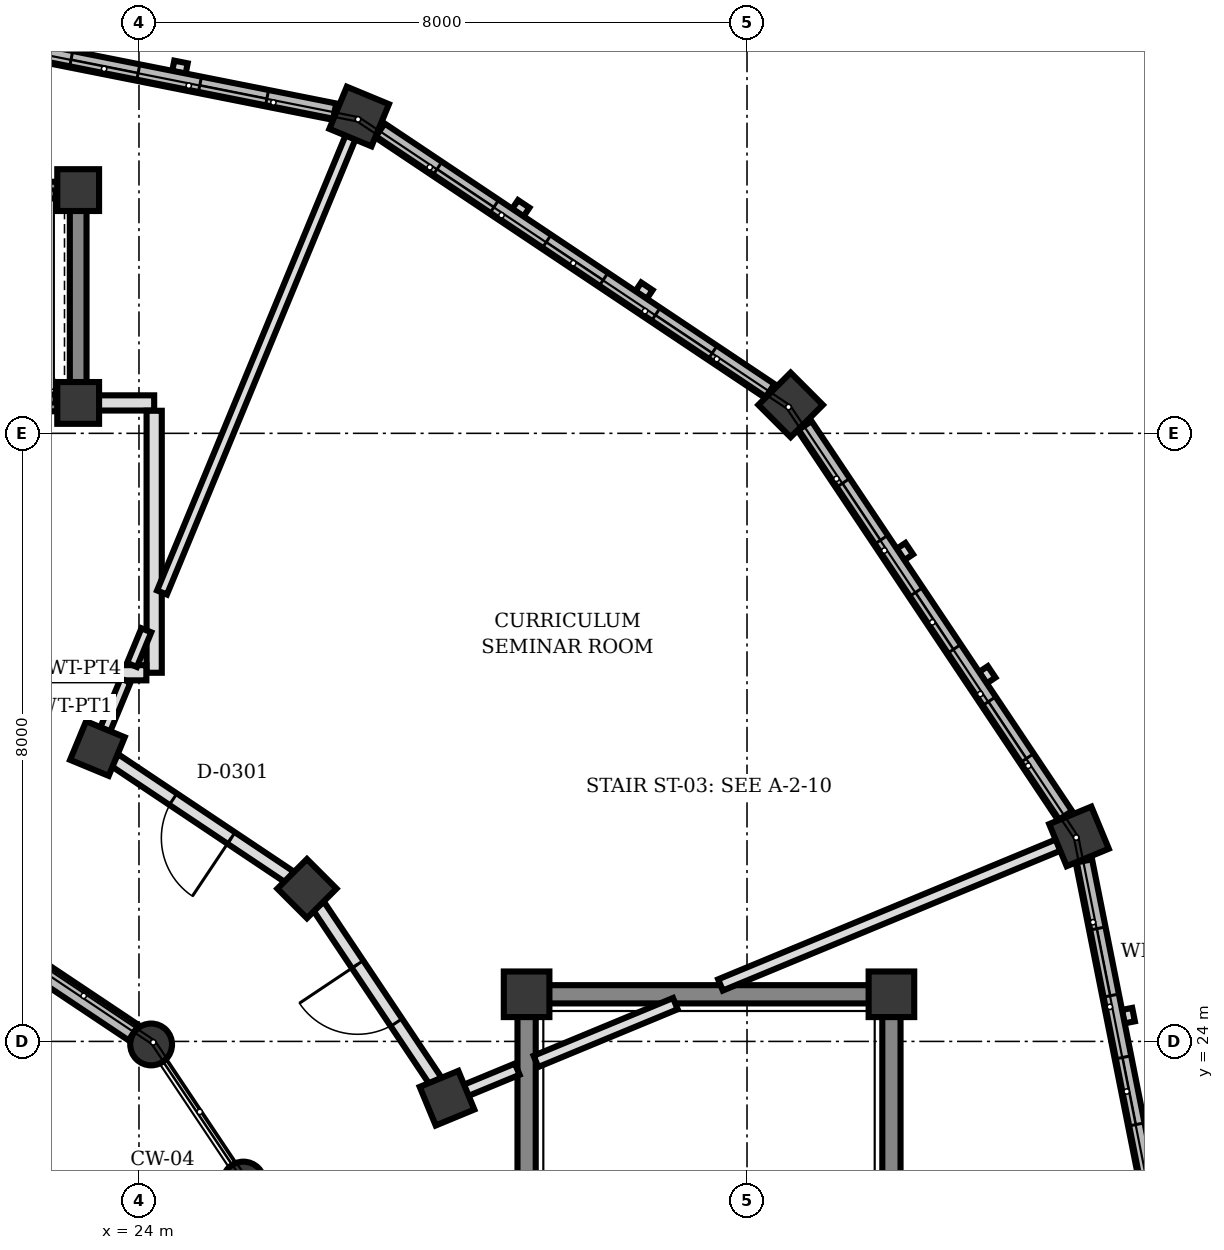
"""IFC4 building model, lengths in metres.
Left out: names, types, materials, properties, quantities, classifications, styles, units other than length and angle.
Written with IfcOpenShell. Run it as: python <this file> out.ifc"""

import sys

from ifc_helpers import new_model, si_unit, direction, frame, frame_2d, origin, origin_2d, place, context, subcontext, project, spatial, rectangle, circle, extrude, element, fill, save


model = new_model("IFC4")
c1 = context("Model", 3, precision=1e-05, world=origin(), true_north=direction((0.0, 1.0)))
c2 = subcontext(c1, "Body", "Model", "MODEL_VIEW")
j1 = project(units=[si_unit("LENGTHUNIT", "METRE"), si_unit("PLANEANGLEUNIT", "RADIAN")], contexts=[c1])
p1 = place(None, origin())
s1 = spatial("IfcSite", under=j1, at=p1, CompositionType="ELEMENT")
p2 = place(p1, origin())
s2 = spatial("IfcBuilding", under=s1, at=p2, CompositionType="ELEMENT")
p3 = place(p2, frame((0.0, 0.0, 8.5)))
s3 = spatial("IfcBuildingStorey", under=s2, at=p3, CompositionType="ELEMENT", Elevation=8.5)
for number, where, z_axis, x_axis in (
    (1, (33.9, 24.62, 0.0), (0.0, 0.0, 1.0), (1.0, 0.0, 0.0)),
    (2, (29.1, 24.62, 0.0), (0.0, 0.0, 1.0), (1.0, 0.0, 0.0)),
):
    element("IfcColumn", number, at=place(p3, frame(where, z_axis=z_axis, x_axis=x_axis)), inside=s3, PredefinedType="COLUMN", context=c2, shape_type="SweptSolid", body=[
        extrude(rectangle(XDim=0.6, YDim=0.6, at=origin_2d()), origin(), (0.0, 0.0, 1.0), 4.0),
    ])
for number, where, z_axis, x_axis in (
    (3, (23.2, 32.4, 0.0), (0.0, 0.0, 1.0), (1.0, 0.0, 0.0)),
    (4, (23.2, 35.2, 0.0), (0.0, 0.0, 1.0), (1.0, 0.0, 0.0)),
):
    element("IfcColumn", number, at=place(p3, frame(where, z_axis=z_axis, x_axis=x_axis)), inside=s3, PredefinedType="COLUMN", context=c2, shape_type="SweptSolid", body=[
        extrude(rectangle(XDim=0.55, YDim=0.55, at=origin_2d()), origin(), (0.0, 0.0, 1.0), 4.0),
    ])
for number, where, z_axis, x_axis in (
    (5, (25.374, 22.143, 0.0), (0.0, 0.0, 1.0), (1.0, 0.0, 0.0)),
    (6, (24.16, 23.96, 0.0), (0.0, 0.0, 1.0), (1.0, 0.0, 0.0)),
):
    element("IfcColumn", number, at=place(p3, frame(where, z_axis=z_axis, x_axis=x_axis)), inside=s3, PredefinedType="COLUMN", context=c2, shape_type="SweptSolid", body=[
        extrude(circle(Radius=0.275, at=origin_2d()), origin(), (0.0, 0.0, 1.0), 4.0),
    ])
for number, where, z_axis, x_axis in (
    (7, (28.053, 23.253, 0.0), (0.0, 0.0, 1.0), (0.924, 0.383, 0.0)),
    (8, (26.21, 26.01, 0.0), (0.0, 0.0, 1.0), (0.707, 0.707, 0.0)),
    (9, (23.453, 27.853, 0.0), (0.0, 0.0, 1.0), (0.383, 0.924, 0.0)),
):
    element("IfcColumn", number, at=place(p3, frame(where, z_axis=z_axis, x_axis=x_axis)), inside=s3, PredefinedType="COLUMN", context=c2, shape_type="SweptSolid", body=[
        extrude(rectangle(XDim=0.55, YDim=0.55, at=origin_2d()), origin(), (0.0, 0.0, 1.0), 4.0),
    ])
for number, where, z_axis, x_axis in (
    (10, (36.368, 26.697, 0.0), (0.0, 0.0, 1.0), (0.924, 0.383, 0.0)),
    (11, (32.574, 32.374, 0.0), (0.0, 0.0, 1.0), (0.707, 0.707, 0.0)),
    (12, (26.897, 36.168, 0.0), (0.0, 0.0, 1.0), (0.383, 0.924, 0.0)),
):
    element("IfcColumn", number, at=place(p3, frame(where, z_axis=z_axis, x_axis=x_axis)), inside=s3, PredefinedType="COLUMN", context=c2, shape_type="SweptSolid", body=[
        extrude(rectangle(XDim=0.6, YDim=0.6, at=origin_2d()), origin(), (0.0, 0.0, 1.0), 4.0),
    ])
p4 = place(p3, frame((36.432, 26.374, 0.0), z_axis=(0.0, 0.0, 1.0), x_axis=(0.195164813773, -0.980770460131, 0.0)))
e13 = element("IfcWall", 13, at=p4, inside=s3, PredefinedType="SOLIDWALL", context=c2, shape_type="SweptSolid", body=[
    extrude(rectangle(XDim=6.17, YDim=0.22, at=frame_2d((3.085, 0.0))), origin(), (0.0, 0.0, 1.0), 3.172),
])
p5 = place(p4, frame((0.907, 0.0, 0.85)))
e14 = element("IfcOpeningElement", 14, at=p5, cuts=e13, PredefinedType="OPENING", context=c2, shape_type="SweptSolid", body=[
    extrude(rectangle(XDim=0.9, YDim=1.4, at=frame_2d((0.45, 0.7))), frame((0.0, 0.12, 0.0), z_axis=(0.0, -1.0, 0.0), x_axis=(1.0, 0.0, 0.0)), (0.0, 0.0, 1.0), 0.24),
])
p6 = place(p4, frame((2.635, 0.0, 0.85)))
e15 = element("IfcOpeningElement", 15, at=p6, cuts=e13, PredefinedType="OPENING", context=c2, shape_type="SweptSolid", body=[
    extrude(rectangle(XDim=0.9, YDim=1.4, at=frame_2d((0.45, 0.7))), frame((0.0, 0.12, 0.0), z_axis=(0.0, -1.0, 0.0), x_axis=(1.0, 0.0, 0.0)), (0.0, 0.0, 1.0), 0.24),
])
p7 = place(p4, frame((4.362, 0.0, 0.85)))
e16 = element("IfcOpeningElement", 16, at=p7, cuts=e13, PredefinedType="OPENING", context=c2, shape_type="SweptSolid", body=[
    extrude(rectangle(XDim=0.9, YDim=1.4, at=frame_2d((0.45, 0.7))), frame((0.0, 0.12, 0.0), z_axis=(0.0, -1.0, 0.0), x_axis=(1.0, 0.0, 0.0)), (0.0, 0.0, 1.0), 0.24),
])
p8 = place(p3, frame((32.757, 32.1, 0.0), z_axis=(0.0, 0.0, 1.0), x_axis=(0.555658736667, -0.831410469242, 0.0)))
e17 = element("IfcWall", 17, at=p8, inside=s3, PredefinedType="SOLIDWALL", context=c2, shape_type="SweptSolid", body=[
    extrude(rectangle(XDim=6.169, YDim=0.22, at=frame_2d((3.084, 0.0))), origin(), (0.0, 0.0, 1.0), 3.172),
])
p9 = place(p8, frame((0.907, 0.0, 0.85)))
e18 = element("IfcOpeningElement", 18, at=p9, cuts=e17, PredefinedType="OPENING", context=c2, shape_type="SweptSolid", body=[
    extrude(rectangle(XDim=0.9, YDim=1.4, at=frame_2d((0.45, 0.7))), frame((0.0, 0.12, 0.0), z_axis=(0.0, -1.0, 0.0), x_axis=(1.0, 0.0, 0.0)), (0.0, 0.0, 1.0), 0.24),
])
p10 = place(p8, frame((2.635, 0.0, 0.85)))
e19 = element("IfcOpeningElement", 19, at=p10, cuts=e17, PredefinedType="OPENING", context=c2, shape_type="SweptSolid", body=[
    extrude(rectangle(XDim=0.9, YDim=1.4, at=frame_2d((0.45, 0.7))), frame((0.0, 0.12, 0.0), z_axis=(0.0, -1.0, 0.0), x_axis=(1.0, 0.0, 0.0)), (0.0, 0.0, 1.0), 0.24),
])
p11 = place(p8, frame((4.362, 0.0, 0.85)))
e20 = element("IfcOpeningElement", 20, at=p11, cuts=e17, PredefinedType="OPENING", context=c2, shape_type="SweptSolid", body=[
    extrude(rectangle(XDim=0.9, YDim=1.4, at=frame_2d((0.45, 0.7))), frame((0.0, 0.12, 0.0), z_axis=(0.0, -1.0, 0.0), x_axis=(1.0, 0.0, 0.0)), (0.0, 0.0, 1.0), 0.24),
])
p12 = place(p3, frame((27.171, 35.985, 0.0), z_axis=(0.0, 0.0, 1.0), x_axis=(0.831392186772, -0.55568609104, 0.0)))
e21 = element("IfcWall", 21, at=p12, inside=s3, PredefinedType="SOLIDWALL", context=c2, shape_type="SweptSolid", body=[
    extrude(rectangle(XDim=6.169, YDim=0.22, at=frame_2d((3.085, 0.0))), origin(), (0.0, 0.0, 1.0), 3.172),
])
p13 = place(p12, frame((0.907, 0.0, 0.85)))
e22 = element("IfcOpeningElement", 22, at=p13, cuts=e21, PredefinedType="OPENING", context=c2, shape_type="SweptSolid", body=[
    extrude(rectangle(XDim=0.9, YDim=1.4, at=frame_2d((0.45, 0.7))), frame((0.0, 0.12, 0.0), z_axis=(0.0, -1.0, 0.0), x_axis=(1.0, 0.0, 0.0)), (0.0, 0.0, 1.0), 0.24),
])
p14 = place(p12, frame((2.635, 0.0, 0.85)))
e23 = element("IfcOpeningElement", 23, at=p14, cuts=e21, PredefinedType="OPENING", context=c2, shape_type="SweptSolid", body=[
    extrude(rectangle(XDim=0.9, YDim=1.4, at=frame_2d((0.45, 0.7))), frame((0.0, 0.12, 0.0), z_axis=(0.0, -1.0, 0.0), x_axis=(1.0, 0.0, 0.0)), (0.0, 0.0, 1.0), 0.24),
])
p15 = place(p12, frame((4.362, 0.0, 0.85)))
e24 = element("IfcOpeningElement", 24, at=p15, cuts=e21, PredefinedType="OPENING", context=c2, shape_type="SweptSolid", body=[
    extrude(rectangle(XDim=0.9, YDim=1.4, at=frame_2d((0.45, 0.7))), frame((0.0, 0.12, 0.0), z_axis=(0.0, -1.0, 0.0), x_axis=(1.0, 0.0, 0.0)), (0.0, 0.0, 1.0), 0.24),
])
p16 = place(p3, frame((23.93, 24.114, 0.0), z_axis=(0.0, 0.0, 1.0), x_axis=(-0.83165874011, 0.555287078904, 0.0)))
e25 = element("IfcWall", 25, at=p16, inside=s3, PredefinedType="SOLIDWALL", context=c2, shape_type="SweptSolid", body=[
    extrude(rectangle(XDim=1.632, YDim=0.24, at=frame_2d((0.816, 0.0))), origin(), (0.0, 0.0, 1.0), 3.222),
])
p17 = place(p3, frame((20.523, 37.436, 0.0), z_axis=(0.0, 0.0, 1.0), x_axis=(0.980770460131, -0.195164813773, 0.0)))
e26 = element("IfcWall", 26, at=p17, inside=s3, PredefinedType="SOLIDWALL", context=c2, shape_type="SweptSolid", body=[
    extrude(rectangle(XDim=6.17, YDim=0.22, at=frame_2d((3.085, 0.0))), origin(), (0.0, 0.0, 1.0), 3.172),
])
p18 = place(p17, frame((0.907, 0.0, 0.85)))
e27 = element("IfcOpeningElement", 27, at=p18, cuts=e26, PredefinedType="OPENING", context=c2, shape_type="SweptSolid", body=[
    extrude(rectangle(XDim=0.9, YDim=1.4, at=frame_2d((0.45, 0.7))), frame((0.0, 0.12, 0.0), z_axis=(0.0, -1.0, 0.0), x_axis=(1.0, 0.0, 0.0)), (0.0, 0.0, 1.0), 0.24),
])
p19 = place(p17, frame((2.635, 0.0, 0.85)))
e28 = element("IfcOpeningElement", 28, at=p19, cuts=e26, PredefinedType="OPENING", context=c2, shape_type="SweptSolid", body=[
    extrude(rectangle(XDim=0.9, YDim=1.4, at=frame_2d((0.45, 0.7))), frame((0.0, 0.12, 0.0), z_axis=(0.0, -1.0, 0.0), x_axis=(1.0, 0.0, 0.0)), (0.0, 0.0, 1.0), 0.24),
])
p20 = place(p17, frame((4.362, 0.0, 0.85)))
e29 = element("IfcOpeningElement", 29, at=p20, cuts=e26, PredefinedType="OPENING", context=c2, shape_type="SweptSolid", body=[
    extrude(rectangle(XDim=0.9, YDim=1.4, at=frame_2d((0.45, 0.7))), frame((0.0, 0.12, 0.0), z_axis=(0.0, -1.0, 0.0), x_axis=(1.0, 0.0, 0.0)), (0.0, 0.0, 1.0), 0.24),
])
p21 = place(p3, frame((29.1, 16.192, 0.0), z_axis=(0.0, 0.0, 1.0), x_axis=(0.0, 1.0, 0.0)))
e30 = element("IfcWall", 30, at=p21, inside=s3, PredefinedType="SHEAR", context=c2, shape_type="SweptSolid", body=[
    extrude(rectangle(XDim=8.136, YDim=0.24, at=frame_2d((4.068, 0.0))), origin(), (0.0, 0.0, 1.0), 3.74),
])
p22 = place(p21, frame((1.012, 0.0, 0.0)))
e31 = element("IfcOpeningElement", 31, at=p22, cuts=e30, PredefinedType="OPENING", context=c2, shape_type="SweptSolid", body=[
    extrude(rectangle(XDim=0.88, YDim=2.1, at=frame_2d((0.44, 1.05))), frame((0.0, 0.13, 0.0), z_axis=(0.0, -1.0, 0.0), x_axis=(1.0, 0.0, 0.0)), (0.0, 0.0, 1.0), 0.26),
])
p23 = place(p3, frame((33.9, 24.328, 0.0), z_axis=(0.0, 0.0, 1.0), x_axis=(0.0, -1.0, 0.0)))
e32 = element("IfcWall", 32, at=p23, inside=s3, PredefinedType="SHEAR", context=c2, shape_type="SweptSolid", body=[
    extrude(rectangle(XDim=8.136, YDim=0.24, at=frame_2d((4.068, 0.0))), origin(), (0.0, 0.0, 1.0), 3.74),
])
p24 = place(p3, frame((33.608, 24.62, 0.0), z_axis=(0.0, 0.0, 1.0), x_axis=(-1.0, 0.0, 0.0)))
e33 = element("IfcWall", 33, at=p24, inside=s3, PredefinedType="SHEAR", context=c2, shape_type="SweptSolid", body=[
    extrude(rectangle(XDim=4.216, YDim=0.24, at=frame_2d((2.108, 0.0))), origin(), (0.0, 0.0, 1.0), 3.74),
])
p25 = place(p3, frame((20.867, 32.4, 0.0), z_axis=(0.0, 0.0, 1.0), x_axis=(1.0, 0.0, 0.0)))
e34 = element("IfcWall", 34, at=p25, inside=s3, PredefinedType="SHEAR", context=c2, shape_type="SweptSolid", body=[
    extrude(rectangle(XDim=2.066, YDim=0.22, at=frame_2d((1.033, 0.0))), origin(), (0.0, 0.0, 1.0), 3.74),
])
p26 = place(p25, frame((0.483, 0.0, 0.0)))
e35 = element("IfcOpeningElement", 35, at=p26, cuts=e34, PredefinedType="OPENING", context=c2, shape_type="SweptSolid", body=[
    extrude(rectangle(XDim=1.1, YDim=2.15, at=frame_2d((0.55, 1.075))), frame((0.0, 0.12, 0.0), z_axis=(0.0, -1.0, 0.0), x_axis=(1.0, 0.0, 0.0)), (0.0, 0.0, 1.0), 0.24),
])
p27 = place(p3, frame((23.2, 32.667, 0.0), z_axis=(0.0, 0.0, 1.0), x_axis=(0.0, 1.0, 0.0)))
e36 = element("IfcWall", 36, at=p27, inside=s3, PredefinedType="SHEAR", context=c2, shape_type="SweptSolid", body=[
    extrude(rectangle(XDim=2.266, YDim=0.22, at=frame_2d((1.133, 0.0))), origin(), (0.0, 0.0, 1.0), 3.74),
])
p28 = place(p3, frame((22.933, 35.2, 0.0), z_axis=(0.0, 0.0, 1.0), x_axis=(-1.0, 0.0, 0.0)))
e37 = element("IfcWall", 37, at=p28, inside=s3, PredefinedType="SHEAR", context=c2, shape_type="SweptSolid", body=[
    extrude(rectangle(XDim=2.066, YDim=0.22, at=frame_2d((1.033, 0.0))), origin(), (0.0, 0.0, 1.0), 3.74),
])
p29 = place(p3, frame((23.467, 32.4, 0.0), z_axis=(0.0, 0.0, 1.0), x_axis=(1.0, 0.0, 0.0)))
e38 = element("IfcWall", 38, at=p29, inside=s3, PredefinedType="PARTITIONING", context=c2, shape_type="SweptSolid", body=[
    extrude(rectangle(XDim=0.733, YDim=0.2, at=frame_2d((0.366, 0.0))), origin(), (0.0, 0.0, 1.0), 3.7),
])
p30 = place(p3, frame((24.2, 28.85, 0.0), z_axis=(0.0, 0.0, 1.0), x_axis=(0.0, 1.0, 0.0)))
e39 = element("IfcWall", 39, at=p30, inside=s3, PredefinedType="PARTITIONING", context=c2, shape_type="SweptSolid", body=[
    extrude(rectangle(XDim=3.447, YDim=0.2, at=frame_2d((1.724, 0.0))), origin(), (0.0, 0.0, 1.0), 3.072),
])
p31 = place(p3, frame((24.097, 28.85, 0.0), z_axis=(0.0, 0.0, 1.0), x_axis=(-1.0, 0.0, 0.0)))
e40 = element("IfcWall", 40, at=p31, inside=s3, PredefinedType="PARTITIONING", context=c2, shape_type="SweptSolid", body=[
    extrude(rectangle(XDim=3.394, YDim=0.2, at=frame_2d((1.697, 0.0))), origin(), (0.0, 0.0, 1.0), 3.072),
])
p32 = place(p31, frame((1.519, 0.0, 0.0)))
e41 = element("IfcOpeningElement", 41, at=p32, cuts=e40, PredefinedType="OPENING", context=c2, shape_type="SweptSolid", body=[
    extrude(rectangle(XDim=0.9, YDim=2.2, at=frame_2d((0.45, 1.1))), frame((0.0, 0.11, 0.0), z_axis=(0.0, -1.0, 0.0), x_axis=(1.0, 0.0, 0.0)), (0.0, 0.0, 1.0), 0.22),
])
p33 = place(p3, frame((28.3, 23.355, 0.0), z_axis=(0.0, 0.0, 1.0), x_axis=(0.924069600435, 0.382224245113, 0.0)))
e42 = element("IfcWall", 42, at=p33, inside=s3, PredefinedType="PARTITIONING", context=c2, shape_type="SweptSolid", body=[
    extrude(rectangle(XDim=0.733, YDim=0.16, at=frame_2d((0.366, 0.0))), origin(), (0.0, 0.0, 1.0), 3.7),
])
p34 = place(p3, frame((29.223, 23.737, 0.0), z_axis=(0.0, 0.0, 1.0), x_axis=(0.923817443679, 0.382833293686, 0.0)))
e43 = element("IfcWall", 43, at=p34, inside=s3, PredefinedType="PARTITIONING", context=c2, shape_type="SweptSolid", body=[
    extrude(rectangle(XDim=1.985, YDim=0.16, at=frame_2d((0.993, 0.0))), origin(), (0.0, 0.0, 1.0), 3.7),
])
p35 = place(p3, frame((31.651, 24.743, 0.0), z_axis=(0.0, 0.0, 1.0), x_axis=(0.923877739946, 0.382687759972, 0.0)))
e44 = element("IfcWall", 44, at=p35, inside=s3, PredefinedType="PARTITIONING", context=c2, shape_type="SweptSolid", body=[
    extrude(rectangle(XDim=4.813, YDim=0.16, at=frame_2d((2.407, 0.0))), origin(), (0.0, 0.0, 1.0), 3.7),
])
p36 = place(p3, frame((23.555, 28.1, 0.0), z_axis=(0.0, 0.0, 1.0), x_axis=(0.38278283439, 0.923838352579, 0.0)))
e45 = element("IfcWall", 45, at=p36, inside=s3, PredefinedType="PARTITIONING", context=c2, shape_type="SweptSolid", body=[
    extrude(rectangle(XDim=0.7, YDim=0.14, at=frame_2d((0.35, 0.0))), origin(), (0.0, 0.0, 1.0), 3.072),
])
p37 = place(p3, frame((23.908, 28.953, 0.0), z_axis=(0.0, 0.0, 1.0), x_axis=(0.3827885685, 0.92383597669, 0.0)))
e46 = element("IfcWall", 46, at=p37, inside=s3, PredefinedType="PARTITIONING", context=c2, shape_type="SweptSolid", body=[
    extrude(rectangle(XDim=0.494, YDim=0.14, at=frame_2d((0.247, 0.0))), origin(), (0.0, 0.0, 1.0), 3.072),
])
p38 = place(p3, frame((24.303, 29.906, 0.0), z_axis=(0.0, 0.0, 1.0), x_axis=(0.382682035927, 0.923880110934, 0.0)))
e47 = element("IfcWall", 47, at=p38, inside=s3, PredefinedType="PARTITIONING", context=c2, shape_type="SweptSolid", body=[
    extrude(rectangle(XDim=6.486, YDim=0.14, at=frame_2d((3.243, 0.0))), origin(), (0.0, 0.0, 1.0), 3.072),
])
p39 = place(p3, frame((27.902, 23.479, 0.0), z_axis=(0.0, 0.0, 1.0), x_axis=(-0.555797002478, 0.831318045056, 0.0)))
e48 = element("IfcWall", 48, at=p39, inside=s3, PredefinedType="PARTITIONING", context=c2, shape_type="SweptSolid", body=[
    extrude(rectangle(XDim=2.773, YDim=0.18, at=frame_2d((1.386, 0.0))), origin(), (0.0, 0.0, 1.0), 3.072),
])
p40 = place(p39, frame((0.926, 0.0, 0.0)))
e49 = element("IfcOpeningElement", 49, at=p40, cuts=e48, PredefinedType="OPENING", context=c2, shape_type="SweptSolid", body=[
    extrude(rectangle(XDim=0.92, YDim=2.1, at=frame_2d((0.46, 1.05))), frame((0.0, 0.1, 0.0), z_axis=(0.0, -1.0, 0.0), x_axis=(1.0, 0.0, 0.0)), (0.0, 0.0, 1.0), 0.2),
])
p41 = place(p3, frame((25.984, 26.161, 0.0), z_axis=(0.0, 0.0, 1.0), x_axis=(-0.831318045056, 0.555797002478, 0.0)))
e50 = element("IfcWall", 50, at=p41, inside=s3, PredefinedType="PARTITIONING", context=c2, shape_type="SweptSolid", body=[
    extrude(rectangle(XDim=2.773, YDim=0.18, at=frame_2d((1.386, 0.0))), origin(), (0.0, 0.0, 1.0), 3.072),
])
p42 = place(p41, frame((0.926, 0.0, 0.0)))
e51 = element("IfcOpeningElement", 51, at=p42, cuts=e50, PredefinedType="OPENING", context=c2, shape_type="SweptSolid", body=[
    extrude(rectangle(XDim=0.92, YDim=2.1, at=frame_2d((0.46, 1.05))), frame((0.0, 0.1, 0.0), z_axis=(0.0, -1.0, 0.0), x_axis=(1.0, 0.0, 0.0)), (0.0, 0.0, 1.0), 0.2),
])
p43 = place(p5, origin())
e52 = element("IfcWindow", 52, at=p43, inside=s3, PartitioningType="SINGLE_PANEL", PredefinedType="WINDOW", context=c2, shape_type="SweptSolid", body=[
    extrude(rectangle(XDim=0.9, YDim=1.4, at=frame_2d((0.45, 0.7))), frame((0.0, 0.03, 0.0), z_axis=(0.0, -1.0, 0.0), x_axis=(1.0, 0.0, 0.0)), (0.0, 0.0, 1.0), 0.06),
])
fill(e14, e52)
p44 = place(p6, origin())
e53 = element("IfcWindow", 53, at=p44, inside=s3, PartitioningType="SINGLE_PANEL", PredefinedType="WINDOW", context=c2, shape_type="SweptSolid", body=[
    extrude(rectangle(XDim=0.9, YDim=1.4, at=frame_2d((0.45, 0.7))), frame((0.0, 0.03, 0.0), z_axis=(0.0, -1.0, 0.0), x_axis=(1.0, 0.0, 0.0)), (0.0, 0.0, 1.0), 0.06),
])
fill(e15, e53)
p45 = place(p9, origin())
e54 = element("IfcWindow", 54, at=p45, inside=s3, PartitioningType="SINGLE_PANEL", PredefinedType="WINDOW", context=c2, shape_type="SweptSolid", body=[
    extrude(rectangle(XDim=0.9, YDim=1.4, at=frame_2d((0.45, 0.7))), frame((0.0, 0.03, 0.0), z_axis=(0.0, -1.0, 0.0), x_axis=(1.0, 0.0, 0.0)), (0.0, 0.0, 1.0), 0.06),
])
fill(e18, e54)
p46 = place(p10, origin())
e55 = element("IfcWindow", 55, at=p46, inside=s3, PartitioningType="SINGLE_PANEL", PredefinedType="WINDOW", context=c2, shape_type="SweptSolid", body=[
    extrude(rectangle(XDim=0.9, YDim=1.4, at=frame_2d((0.45, 0.7))), frame((0.0, 0.03, 0.0), z_axis=(0.0, -1.0, 0.0), x_axis=(1.0, 0.0, 0.0)), (0.0, 0.0, 1.0), 0.06),
])
fill(e19, e55)
p47 = place(p11, origin())
e56 = element("IfcWindow", 56, at=p47, inside=s3, PartitioningType="SINGLE_PANEL", PredefinedType="WINDOW", context=c2, shape_type="SweptSolid", body=[
    extrude(rectangle(XDim=0.9, YDim=1.4, at=frame_2d((0.45, 0.7))), frame((0.0, 0.03, 0.0), z_axis=(0.0, -1.0, 0.0), x_axis=(1.0, 0.0, 0.0)), (0.0, 0.0, 1.0), 0.06),
])
fill(e20, e56)
p48 = place(p13, origin())
e57 = element("IfcWindow", 57, at=p48, inside=s3, PartitioningType="SINGLE_PANEL", PredefinedType="WINDOW", context=c2, shape_type="SweptSolid", body=[
    extrude(rectangle(XDim=0.9, YDim=1.4, at=frame_2d((0.45, 0.7))), frame((0.0, 0.03, 0.0), z_axis=(0.0, -1.0, 0.0), x_axis=(1.0, 0.0, 0.0)), (0.0, 0.0, 1.0), 0.06),
])
fill(e22, e57)
p49 = place(p14, origin())
e58 = element("IfcWindow", 58, at=p49, inside=s3, PartitioningType="SINGLE_PANEL", PredefinedType="WINDOW", context=c2, shape_type="SweptSolid", body=[
    extrude(rectangle(XDim=0.9, YDim=1.4, at=frame_2d((0.45, 0.7))), frame((0.0, 0.03, 0.0), z_axis=(0.0, -1.0, 0.0), x_axis=(1.0, 0.0, 0.0)), (0.0, 0.0, 1.0), 0.06),
])
fill(e23, e58)
p50 = place(p15, origin())
e59 = element("IfcWindow", 59, at=p50, inside=s3, PartitioningType="SINGLE_PANEL", PredefinedType="WINDOW", context=c2, shape_type="SweptSolid", body=[
    extrude(rectangle(XDim=0.9, YDim=1.4, at=frame_2d((0.45, 0.7))), frame((0.0, 0.03, 0.0), z_axis=(0.0, -1.0, 0.0), x_axis=(1.0, 0.0, 0.0)), (0.0, 0.0, 1.0), 0.06),
])
fill(e24, e59)
p51 = place(p19, origin())
e60 = element("IfcWindow", 60, at=p51, inside=s3, PartitioningType="SINGLE_PANEL", PredefinedType="WINDOW", context=c2, shape_type="SweptSolid", body=[
    extrude(rectangle(XDim=0.9, YDim=1.4, at=frame_2d((0.45, 0.7))), frame((0.0, 0.03, 0.0), z_axis=(0.0, -1.0, 0.0), x_axis=(1.0, 0.0, 0.0)), (0.0, 0.0, 1.0), 0.06),
])
fill(e28, e60)
p52 = place(p20, origin())
e61 = element("IfcWindow", 61, at=p52, inside=s3, PartitioningType="SINGLE_PANEL", PredefinedType="WINDOW", context=c2, shape_type="SweptSolid", body=[
    extrude(rectangle(XDim=0.9, YDim=1.4, at=frame_2d((0.45, 0.7))), frame((0.0, 0.03, 0.0), z_axis=(0.0, -1.0, 0.0), x_axis=(1.0, 0.0, 0.0)), (0.0, 0.0, 1.0), 0.06),
])
fill(e29, e61)
p53 = place(p40, origin())
e62 = element("IfcDoor", 62, at=p53, inside=s3, OperationType="SINGLE_SWING_RIGHT", PredefinedType="DOOR", context=c2, shape_type="SweptSolid", body=[
    extrude(rectangle(XDim=0.92, YDim=2.1, at=frame_2d((0.46, 1.05))), frame((0.0, 0.025, 0.0), z_axis=(0.0, -1.0, 0.0), x_axis=(1.0, 0.0, 0.0)), (0.0, 0.0, 1.0), 0.05),
])
fill(e49, e62)
p54 = place(p42, origin())
e63 = element("IfcDoor", 63, at=p54, inside=s3, OperationType="SINGLE_SWING_LEFT", PredefinedType="DOOR", context=c2, shape_type="SweptSolid", body=[
    extrude(rectangle(XDim=0.92, YDim=2.1, at=frame_2d((0.46, 1.05))), frame((0.0, 0.025, 0.0), z_axis=(0.0, -1.0, 0.0), x_axis=(1.0, 0.0, 0.0)), (0.0, 0.0, 1.0), 0.05),
])
fill(e51, e63)
save(model, sys.argv[1])
